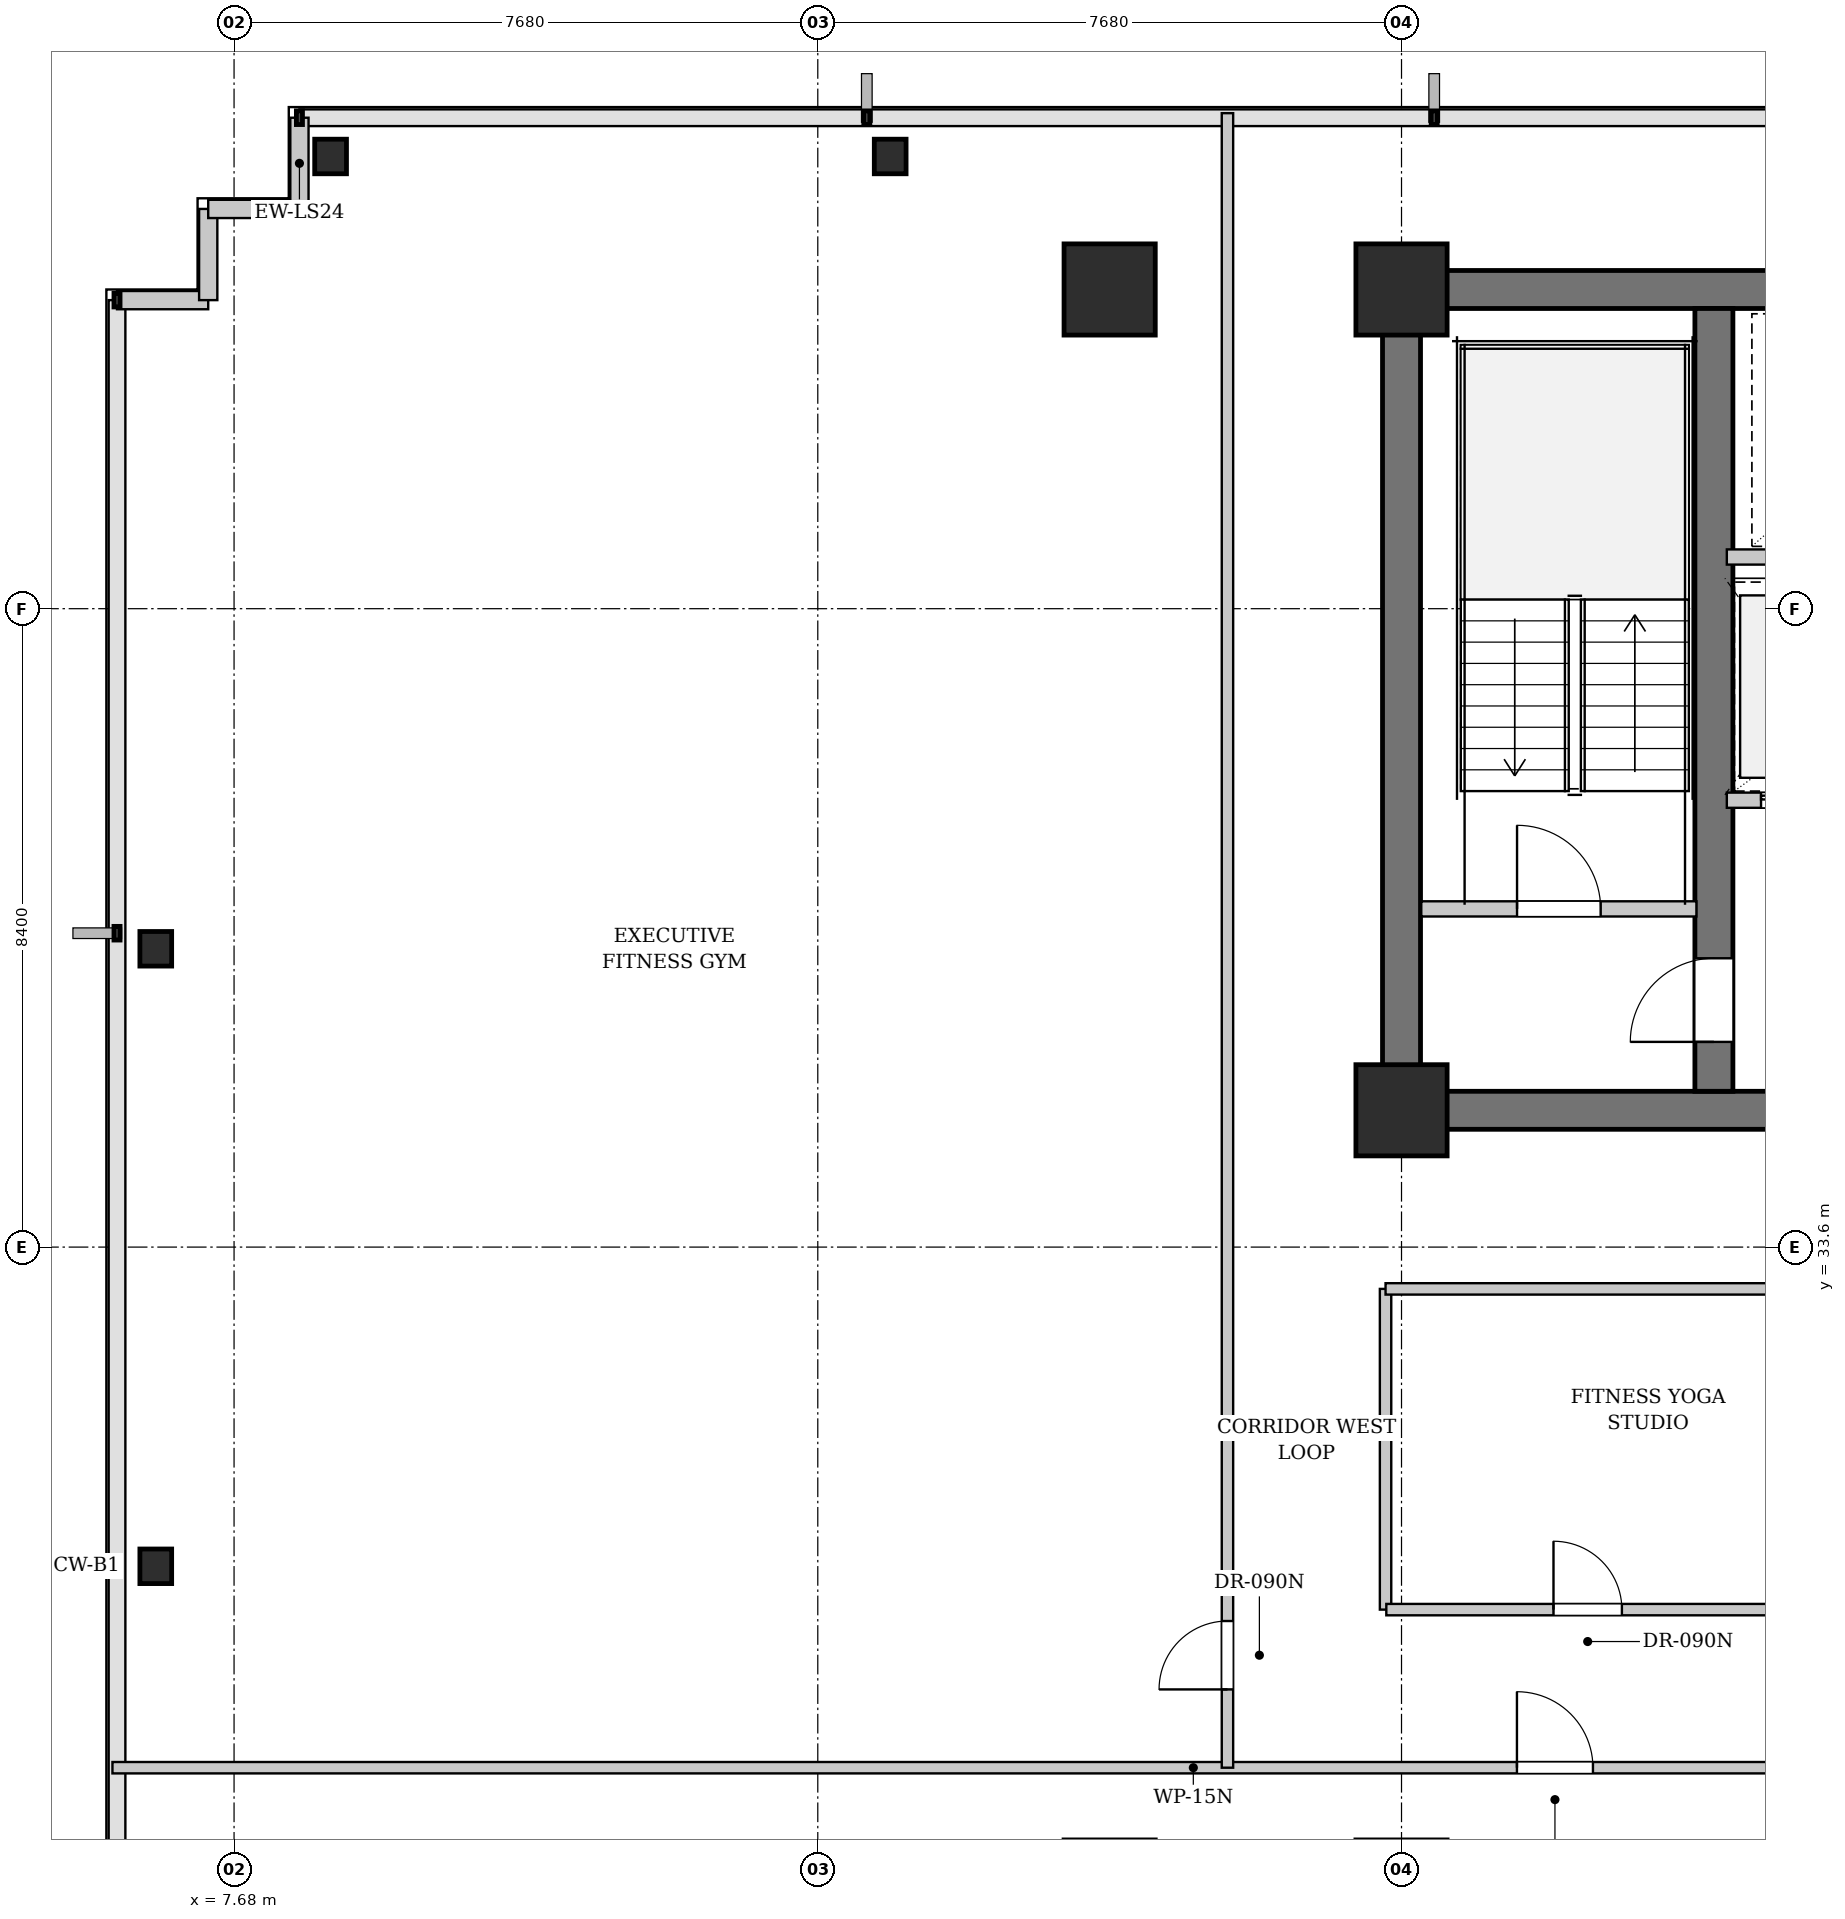
"""IFC4 building model, lengths in metres.
Left out: names, types, materials, properties, quantities, classifications, styles, units other than length and angle.
Written with IfcOpenShell. Run it as: python <this file> out.ifc"""

import sys

from ifc_helpers import new_model, si_unit, direction, frame, frame_2d, origin, origin_2d, place, context, subcontext, project, spatial, rectangle, i_section, extrude, element, fill, save


model = new_model("IFC4")
c1 = context("Model", 3, precision=1e-05, world=origin(), true_north=direction((0.0, 1.0)))
c2 = subcontext(c1, "Body", "Model", "MODEL_VIEW")
j1 = project(units=[si_unit("LENGTHUNIT", "METRE"), si_unit("PLANEANGLEUNIT", "RADIAN")], contexts=[c1])
p1 = place(None, origin())
s1 = spatial("IfcSite", under=j1, at=p1, CompositionType="ELEMENT")
p2 = place(p1, origin())
s2 = spatial("IfcBuilding", under=s1, at=p2, CompositionType="ELEMENT")
p3 = place(p2, frame((0.0, 0.0, 54.2)))
s3 = spatial("IfcBuildingStorey", under=s2, at=p3, CompositionType="ELEMENT", Elevation=54.2)
p4 = place(p3, frame((22.79, 46.2, 0.0), z_axis=(0.0, 0.0, 1.0), x_axis=(1.0, 0.0, 0.0)))
e1 = element("IfcWall", 1, at=p4, inside=s3, PredefinedType="SHEAR", context=c2, shape_type="SweptSolid", body=[
    extrude(rectangle(XDim=31.22, YDim=0.5, at=frame_2d((15.61, 0.0))), origin(), (0.0, 0.0, 1.0), 3.18),
])
p5 = place(p3, frame((22.79, 35.4, 0.0), z_axis=(0.0, 0.0, 1.0), x_axis=(1.0, 0.0, 0.0)))
e2 = element("IfcWall", 2, at=p5, inside=s3, PredefinedType="SHEAR", context=c2, shape_type="SweptSolid", body=[
    extrude(rectangle(XDim=5.41, YDim=0.5, at=frame_2d((2.705, 0.0))), origin(), (0.0, 0.0, 1.0), 3.18),
])
p6 = place(p3, frame((23.04, 35.65, 0.0), z_axis=(0.0, 0.0, 1.0), x_axis=(0.0, 1.0, 0.0)))
e3 = element("IfcWall", 3, at=p6, inside=s3, PredefinedType="SHEAR", context=c2, shape_type="SweptSolid", body=[
    extrude(rectangle(XDim=10.3, YDim=0.5, at=frame_2d((5.15, 0.0))), origin(), (0.0, 0.0, 1.0), 3.18),
])
p7 = place(p3, frame((27.15, 35.65, 0.0), z_axis=(0.0, 0.0, 1.0), x_axis=(0.0, 1.0, 0.0)))
e4 = element("IfcWall", 4, at=p7, inside=s3, PredefinedType="SHEAR", context=c2, shape_type="SweptSolid", body=[
    extrude(rectangle(XDim=10.3, YDim=0.5, at=frame_2d((5.15, 0.0))), origin(), (0.0, 0.0, 1.0), 3.18),
])
p8 = place(p7, frame((0.65, 0.0, 0.0)))
e5 = element("IfcOpeningElement", 5, at=p8, cuts=e4, PredefinedType="OPENING", context=c2, shape_type="SweptSolid", body=[
    extrude(rectangle(XDim=1.1, YDim=2.15, at=frame_2d((0.55, 1.075))), frame((0.0, 0.26, 0.0), z_axis=(0.0, -1.0, 0.0), x_axis=(1.0, 0.0, 0.0)), (0.0, 0.0, 1.0), 0.52),
])
for number, where, z_axis, x_axis in (
    (6, (23.04, 35.4, 0.0), (0.0, 0.0, 1.0), (1.0, 0.0, 0.0)),
    (7, (23.04, 46.2, 0.0), (0.0, 0.0, 1.0), (1.0, 0.0, 0.0)),
    (8, (19.2, 46.2, 0.0), (0.0, 0.0, 1.0), (1.0, 0.0, 0.0)),
):
    element("IfcColumn", number, at=place(p3, frame(where, z_axis=z_axis, x_axis=x_axis)), inside=s3, PredefinedType="COLUMN", context=c2, shape_type="SweptSolid", body=[
        extrude(rectangle(XDim=1.2, YDim=1.2, at=origin_2d()), origin(), (0.0, 0.0, 1.0), 3.4),
    ])
for number, where, z_axis, x_axis in (
    (9, (8.95, 47.95, 0.0), (0.0, 0.0, 1.0), (1.0, 0.0, 0.0)),
    (10, (16.312, 47.95, 0.0), (0.0, 0.0, 1.0), (1.0, 0.0, 0.0)),
    (11, (6.65, 29.4, 0.0), (0.0, 0.0, 1.0), (1.0, 0.0, 0.0)),
    (12, (6.65, 37.525, 0.0), (0.0, 0.0, 1.0), (1.0, 0.0, 0.0)),
):
    element("IfcColumn", number, at=place(p3, frame(where, z_axis=z_axis, x_axis=x_axis)), inside=s3, PredefinedType="COLUMN", context=c2, shape_type="SweptSolid", body=[
        extrude(i_section(OverallWidth=0.418, OverallDepth=0.455, WebThickness=0.042, FlangeThickness=0.068, FilletRadius=0.015, at=origin_2d()), origin(), (0.0, 0.0, 1.0), 3.4),
    ])
p9 = place(p3, frame((6.14, 46.06, 0.0), z_axis=(0.0, 0.0, 1.0), x_axis=(1.0, 0.0, 0.0)))
e13 = element("IfcWall", 13, at=p9, inside=s3, PredefinedType="SOLIDWALL", context=c2, shape_type="SweptSolid", body=[
    extrude(rectangle(XDim=1.2, YDim=0.24, at=frame_2d((0.6, 0.0))), origin(), (0.0, 0.0, 1.0), 3.18),
])
for number, where, z_axis, x_axis in (
    (14, (7.34, 46.06, 0.0), (0.0, 0.0, 1.0), (0.0, 1.0, 0.0)),
    (15, (7.34, 47.26, 0.0), (0.0, 0.0, 1.0), (1.0, 0.0, 0.0)),
    (16, (8.54, 47.26, 0.0), (0.0, 0.0, 1.0), (0.0, 1.0, 0.0)),
):
    element("IfcWall", number, at=place(p3, frame(where, z_axis=z_axis, x_axis=x_axis)), inside=s3, PredefinedType="SOLIDWALL", context=c2, shape_type="SweptSolid", body=[
        extrude(rectangle(XDim=1.2, YDim=0.24, at=frame_2d((0.6, 0.0))), origin(), (0.0, 0.0, 1.0), 3.18),
    ])
p10 = place(p3, frame((23.3, 38.05, 0.0), z_axis=(0.0, 0.0, 1.0), x_axis=(1.0, 0.0, 0.0)))
e17 = element("IfcWall", 17, at=p10, inside=s3, PredefinedType="PARTITIONING", context=c2, shape_type="SweptSolid", body=[
    extrude(rectangle(XDim=3.62, YDim=0.2, at=frame_2d((1.81, 0.0))), origin(), (0.0, 0.0, 1.0), 3.18),
])
p11 = place(p10, frame((1.26, 0.0, 0.0)))
e18 = element("IfcOpeningElement", 18, at=p11, cuts=e17, PredefinedType="OPENING", context=c2, shape_type="SweptSolid", body=[
    extrude(rectangle(XDim=1.1, YDim=2.15, at=frame_2d((0.55, 1.075))), frame((0.0, 0.11, 0.0), z_axis=(0.0, -1.0, 0.0), x_axis=(1.0, 0.0, 0.0)), (0.0, 0.0, 1.0), 0.22),
])
p12 = place(p3, frame((27.32, 39.48, 0.0), z_axis=(0.0, 0.0, 1.0), x_axis=(1.0, 0.0, 0.0)))
e19 = element("IfcWall", 19, at=p12, inside=s3, PredefinedType="PARTITIONING", context=c2, shape_type="SweptSolid", body=[
    extrude(rectangle(XDim=3.94, YDim=0.2, at=frame_2d((1.97, 0.0))), origin(), (0.0, 0.0, 1.0), 3.18),
])
p13 = place(p12, frame((0.45, 0.0, 0.0)))
e20 = element("IfcOpeningElement", 20, at=p13, cuts=e19, PredefinedType="OPENING", context=c2, shape_type="SweptSolid", body=[
    extrude(rectangle(XDim=1.1, YDim=2.2, at=frame_2d((0.55, 1.1))), frame((0.0, 0.11, 0.0), z_axis=(0.0, -1.0, 0.0), x_axis=(1.0, 0.0, 0.0)), (0.0, 0.0, 1.0), 0.22),
])
p14 = place(p12, frame((2.41, 0.0, 0.0)))
e21 = element("IfcOpeningElement", 21, at=p14, cuts=e19, PredefinedType="OPENING", context=c2, shape_type="SweptSolid", body=[
    extrude(rectangle(XDim=1.1, YDim=2.2, at=frame_2d((0.55, 1.1))), frame((0.0, 0.11, 0.0), z_axis=(0.0, -1.0, 0.0), x_axis=(1.0, 0.0, 0.0)), (0.0, 0.0, 1.0), 0.22),
])
p15 = place(p3, frame((27.32, 42.68, 0.0), z_axis=(0.0, 0.0, 1.0), x_axis=(1.0, 0.0, 0.0)))
e22 = element("IfcWall", 22, at=p15, inside=s3, PredefinedType="PARTITIONING", context=c2, shape_type="SweptSolid", body=[
    extrude(rectangle(XDim=5.33, YDim=0.2, at=frame_2d((2.665, 0.0))), origin(), (0.0, 0.0, 1.0), 3.18),
])
p16 = place(p15, frame((4.18, 0.0, 0.0)))
e23 = element("IfcOpeningElement", 23, at=p16, cuts=e22, PredefinedType="OPENING", context=c2, shape_type="SweptSolid", body=[
    extrude(rectangle(XDim=0.9, YDim=2.15, at=frame_2d((0.45, 1.075))), frame((0.0, 0.11, 0.0), z_axis=(0.0, -1.0, 0.0), x_axis=(1.0, 0.0, 0.0)), (0.0, 0.0, 1.0), 0.22),
])
p17 = place(p3, frame((6.08, 26.75, 0.0), z_axis=(0.0, 0.0, 1.0), x_axis=(1.0, 0.0, 0.0)))
e24 = element("IfcWall", 24, at=p17, inside=s3, PredefinedType="PARTITIONING", context=c2, shape_type="SweptSolid", body=[
    extrude(rectangle(XDim=64.64, YDim=0.15, at=frame_2d((32.32, 0.0))), origin(), (0.0, 0.0, 1.0), 3.18),
])
p18 = place(p17, frame((18.479, 0.0, 0.0)))
e25 = element("IfcOpeningElement", 25, at=p18, cuts=e24, PredefinedType="OPENING", context=c2, shape_type="SweptSolid", body=[
    extrude(rectangle(XDim=1.0, YDim=2.15, at=frame_2d((0.5, 1.075))), frame((0.0, 0.085, 0.0), z_axis=(0.0, -1.0, 0.0), x_axis=(1.0, 0.0, 0.0)), (0.0, 0.0, 1.0), 0.17),
])
p19 = place(p17, frame((22.394, 0.0, 0.0)))
e26 = element("IfcOpeningElement", 26, at=p19, cuts=e24, PredefinedType="OPENING", context=c2, shape_type="SweptSolid", body=[
    extrude(rectangle(XDim=1.0, YDim=2.15, at=frame_2d((0.5, 1.075))), frame((0.0, 0.085, 0.0), z_axis=(0.0, -1.0, 0.0), x_axis=(1.0, 0.0, 0.0)), (0.0, 0.0, 1.0), 0.17),
])
p20 = place(p17, frame((28.206, 0.0, 0.0)))
e27 = element("IfcOpeningElement", 27, at=p20, cuts=e24, PredefinedType="OPENING", context=c2, shape_type="SweptSolid", body=[
    extrude(rectangle(XDim=1.0, YDim=2.15, at=frame_2d((0.5, 1.075))), frame((0.0, 0.085, 0.0), z_axis=(0.0, -1.0, 0.0), x_axis=(1.0, 0.0, 0.0)), (0.0, 0.0, 1.0), 0.17),
])
p21 = place(p17, frame((33.892, 0.0, 0.0)))
e28 = element("IfcOpeningElement", 28, at=p21, cuts=e24, PredefinedType="OPENING", context=c2, shape_type="SweptSolid", body=[
    extrude(rectangle(XDim=1.0, YDim=2.15, at=frame_2d((0.5, 1.075))), frame((0.0, 0.085, 0.0), z_axis=(0.0, -1.0, 0.0), x_axis=(1.0, 0.0, 0.0)), (0.0, 0.0, 1.0), 0.17),
])
p22 = place(p17, frame((37.465, 0.0, 0.0)))
e29 = element("IfcOpeningElement", 29, at=p22, cuts=e24, PredefinedType="OPENING", context=c2, shape_type="SweptSolid", body=[
    extrude(rectangle(XDim=1.0, YDim=2.15, at=frame_2d((0.5, 1.075))), frame((0.0, 0.085, 0.0), z_axis=(0.0, -1.0, 0.0), x_axis=(1.0, 0.0, 0.0)), (0.0, 0.0, 1.0), 0.17),
])
p23 = place(p17, frame((44.76, 0.0, 0.0)))
e30 = element("IfcOpeningElement", 30, at=p23, cuts=e24, PredefinedType="OPENING", context=c2, shape_type="SweptSolid", body=[
    extrude(rectangle(XDim=1.0, YDim=2.15, at=frame_2d((0.5, 1.075))), frame((0.0, 0.085, 0.0), z_axis=(0.0, -1.0, 0.0), x_axis=(1.0, 0.0, 0.0)), (0.0, 0.0, 1.0), 0.17),
])
p24 = place(p3, frame((20.75, 26.75, 0.0), z_axis=(0.0, 0.0, 1.0), x_axis=(0.0, 1.0, 0.0)))
e31 = element("IfcWall", 31, at=p24, inside=s3, PredefinedType="PARTITIONING", context=c2, shape_type="SweptSolid", body=[
    extrude(rectangle(XDim=21.77, YDim=0.15, at=frame_2d((10.885, 0.0))), origin(), (0.0, 0.0, 1.0), 3.18),
])
p25 = place(p24, frame((1.03, 0.0, 0.0)))
e32 = element("IfcOpeningElement", 32, at=p25, cuts=e31, PredefinedType="OPENING", context=c2, shape_type="SweptSolid", body=[
    extrude(rectangle(XDim=0.9, YDim=2.15, at=frame_2d((0.45, 1.075))), frame((0.0, 0.085, 0.0), z_axis=(0.0, -1.0, 0.0), x_axis=(1.0, 0.0, 0.0)), (0.0, 0.0, 1.0), 0.17),
])
p26 = place(p3, frame((22.83, 28.83, 0.0), z_axis=(0.0, 0.0, 1.0), x_axis=(0.0, 1.0, 0.0)))
e33 = element("IfcWall", 33, at=p26, inside=s3, PredefinedType="PARTITIONING", context=c2, shape_type="SweptSolid", body=[
    extrude(rectangle(XDim=4.22, YDim=0.15, at=frame_2d((2.11, 0.0))), origin(), (0.0, 0.0, 1.0), 2.475),
])
p27 = place(p3, frame((22.83, 33.05, 0.0), z_axis=(0.0, 0.0, 1.0), x_axis=(1.0, 0.0, 0.0)))
e34 = element("IfcWall", 34, at=p27, inside=s3, PredefinedType="PARTITIONING", context=c2, shape_type="SweptSolid", body=[
    extrude(rectangle(XDim=31.19, YDim=0.15, at=frame_2d((15.595, 0.0))), origin(), (0.0, 0.0, 1.0), 3.18),
])
p28 = place(p3, frame((22.84, 28.83, 0.0), z_axis=(0.0, 0.0, 1.0), x_axis=(1.0, 0.0, 0.0)))
e35 = element("IfcWall", 35, at=p28, inside=s3, PredefinedType="PARTITIONING", context=c2, shape_type="SweptSolid", body=[
    extrude(rectangle(XDim=31.17, YDim=0.15, at=frame_2d((15.585, 0.0))), origin(), (0.0, 0.0, 1.0), 3.18),
])
p29 = place(p28, frame((2.199, 0.0, 0.0)))
e36 = element("IfcOpeningElement", 36, at=p29, cuts=e35, PredefinedType="OPENING", context=c2, shape_type="SweptSolid", body=[
    extrude(rectangle(XDim=0.9, YDim=2.15, at=frame_2d((0.45, 1.075))), frame((0.0, 0.085, 0.0), z_axis=(0.0, -1.0, 0.0), x_axis=(1.0, 0.0, 0.0)), (0.0, 0.0, 1.0), 0.17),
])
p30 = place(p28, frame((8.59, 0.0, 0.0)))
e37 = element("IfcOpeningElement", 37, at=p30, cuts=e35, PredefinedType="OPENING", context=c2, shape_type="SweptSolid", body=[
    extrude(rectangle(XDim=0.9, YDim=2.15, at=frame_2d((0.45, 1.075))), frame((0.0, 0.085, 0.0), z_axis=(0.0, -1.0, 0.0), x_axis=(1.0, 0.0, 0.0)), (0.0, 0.0, 1.0), 0.17),
])
p31 = place(p28, frame((17.161, 0.0, 0.0)))
e38 = element("IfcOpeningElement", 38, at=p31, cuts=e35, PredefinedType="OPENING", context=c2, shape_type="SweptSolid", body=[
    extrude(rectangle(XDim=0.9, YDim=2.15, at=frame_2d((0.45, 1.075))), frame((0.0, 0.085, 0.0), z_axis=(0.0, -1.0, 0.0), x_axis=(1.0, 0.0, 0.0)), (0.0, 0.0, 1.0), 0.17),
])
p32 = place(p28, frame((26.356, 0.0, 0.0)))
e39 = element("IfcOpeningElement", 39, at=p32, cuts=e35, PredefinedType="OPENING", context=c2, shape_type="SweptSolid", body=[
    extrude(rectangle(XDim=0.9, YDim=2.15, at=frame_2d((0.45, 1.075))), frame((0.0, 0.085, 0.0), z_axis=(0.0, -1.0, 0.0), x_axis=(1.0, 0.0, 0.0)), (0.0, 0.0, 1.0), 0.17),
])
p33 = place(p11, origin())
e40 = element("IfcDoor", 40, at=p33, inside=s3, OperationType="SINGLE_SWING_LEFT", PredefinedType="DOOR", context=c2, shape_type="SweptSolid", body=[
    extrude(rectangle(XDim=1.1, YDim=2.15, at=frame_2d((0.55, 1.075))), frame((0.0, 0.025, 0.0), z_axis=(0.0, -1.0, 0.0), x_axis=(1.0, 0.0, 0.0)), (0.0, 0.0, 1.0), 0.05),
])
fill(e18, e40)
p34 = place(p13, origin())
e41 = element("IfcDoor", 41, at=p34, inside=s3, OperationType="DOUBLE_DOOR_SLIDING", PredefinedType="DOOR", context=c2, shape_type="SweptSolid", body=[
    extrude(rectangle(XDim=1.1, YDim=2.2, at=frame_2d((0.55, 1.1))), frame((0.0, 0.025, 0.0), z_axis=(0.0, -1.0, 0.0), x_axis=(1.0, 0.0, 0.0)), (0.0, 0.0, 1.0), 0.05),
])
fill(e20, e41)
p35 = place(p18, origin())
e42 = element("IfcDoor", 42, at=p35, inside=s3, OperationType="SINGLE_SWING_LEFT", PredefinedType="DOOR", context=c2, shape_type="SweptSolid", body=[
    extrude(rectangle(XDim=1.0, YDim=2.15, at=frame_2d((0.5, 1.075))), frame((0.0, 0.025, 0.0), z_axis=(0.0, -1.0, 0.0), x_axis=(1.0, 0.0, 0.0)), (0.0, 0.0, 1.0), 0.05),
])
fill(e25, e42)
p36 = place(p25, origin())
e43 = element("IfcDoor", 43, at=p36, inside=s3, OperationType="SINGLE_SWING_LEFT", PredefinedType="DOOR", context=c2, shape_type="SweptSolid", body=[
    extrude(rectangle(XDim=0.9, YDim=2.15, at=frame_2d((0.45, 1.075))), frame((0.0, 0.025, 0.0), z_axis=(0.0, -1.0, 0.0), x_axis=(1.0, 0.0, 0.0)), (0.0, 0.0, 1.0), 0.05),
])
fill(e32, e43)
p37 = place(p29, origin())
e44 = element("IfcDoor", 44, at=p37, inside=s3, OperationType="SINGLE_SWING_LEFT", PredefinedType="DOOR", context=c2, shape_type="SweptSolid", body=[
    extrude(rectangle(XDim=0.9, YDim=2.15, at=frame_2d((0.45, 1.075))), frame((0.0, 0.025, 0.0), z_axis=(0.0, -1.0, 0.0), x_axis=(1.0, 0.0, 0.0)), (0.0, 0.0, 1.0), 0.05),
])
fill(e36, e44)
p38 = place(p8, origin())
e45 = element("IfcDoor", 45, at=p38, inside=s3, OperationType="SINGLE_SWING_LEFT", PredefinedType="DOOR", context=c2, shape_type="SweptSolid", body=[
    extrude(rectangle(XDim=1.1, YDim=2.15, at=frame_2d((0.55, 1.075))), frame((0.0, 0.025, 0.0), z_axis=(0.0, -1.0, 0.0), x_axis=(1.0, 0.0, 0.0)), (0.0, 0.0, 1.0), 0.05),
])
fill(e5, e45)
save(model, sys.argv[1])
